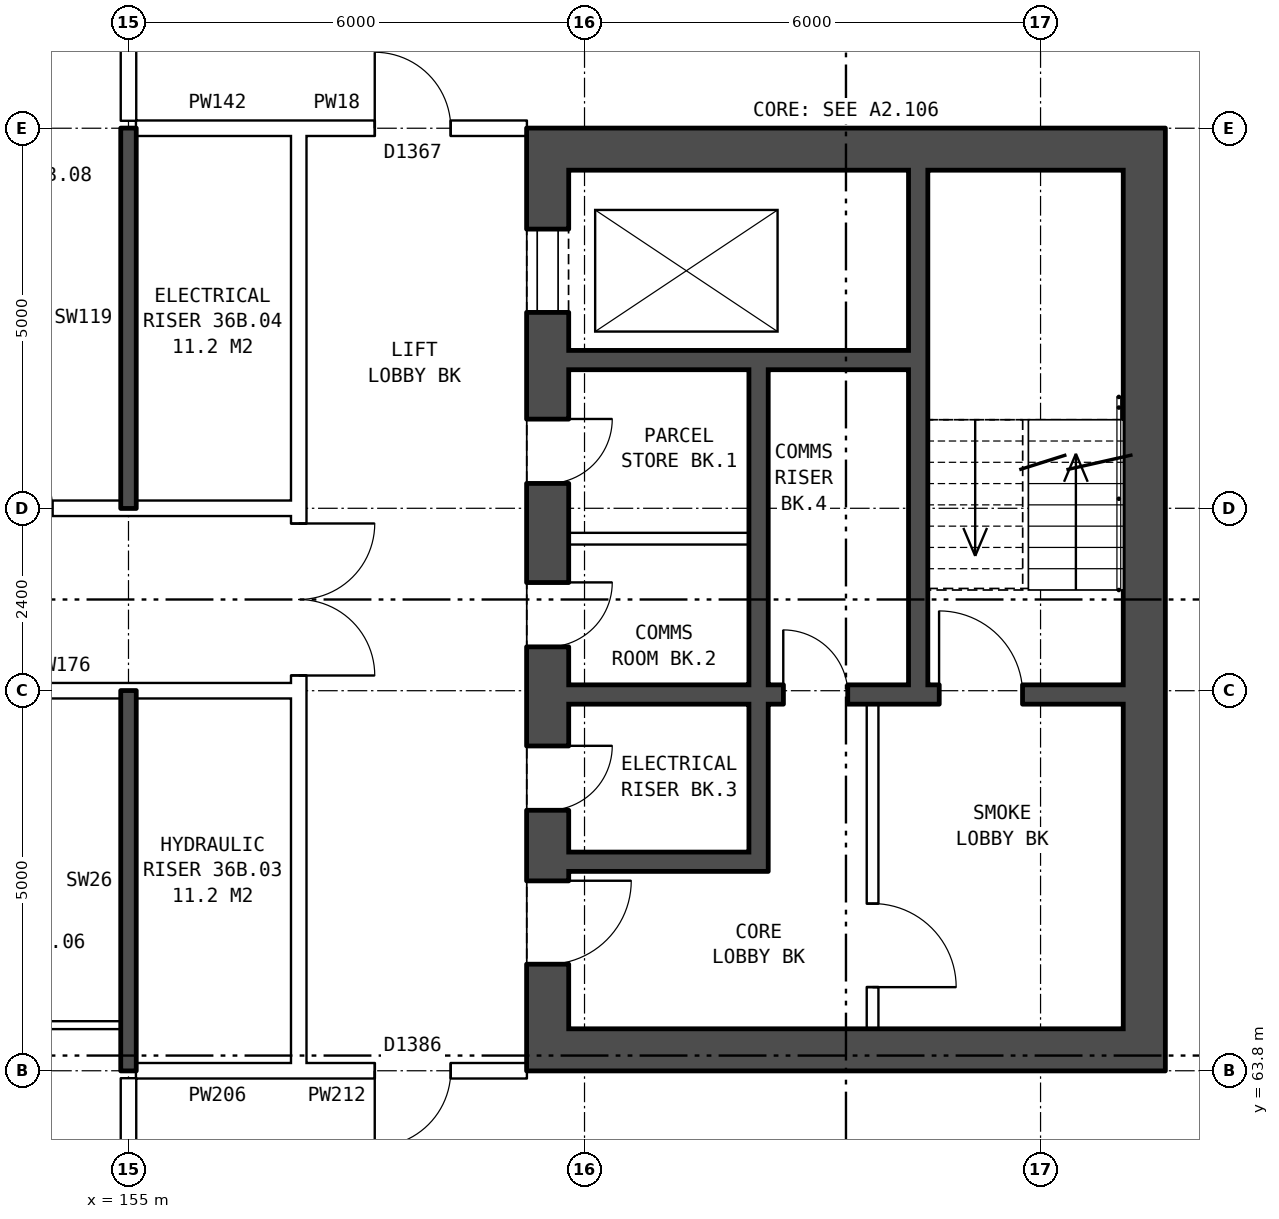
"""IFC4 building model, lengths in metres.
Left out: names, types, materials, properties, quantities, classifications, styles, units other than length and angle.
Written with IfcOpenShell. Run it as: python <this file> out.ifc"""

import sys

from ifc_helpers import new_model, si_unit, direction, frame, frame_2d, origin, place, context, subcontext, project, spatial, rectangle, extrude, element, fill, save


model = new_model("IFC4")
c1 = context("Model", 3, precision=1e-05, world=origin(), true_north=direction((0.0, 1.0)))
c2 = subcontext(c1, "Body", "Model", "MODEL_VIEW")
j1 = project(units=[si_unit("LENGTHUNIT", "METRE"), si_unit("PLANEANGLEUNIT", "RADIAN")], contexts=[c1])
p1 = place(None, origin())
s1 = spatial("IfcSite", under=j1, at=p1, CompositionType="ELEMENT")
p2 = place(p1, origin())
s2 = spatial("IfcBuilding", under=s1, at=p2, CompositionType="ELEMENT")
p3 = place(p2, frame((0.0, 0.0, 129.9)))
s3 = spatial("IfcBuildingStorey", under=s2, at=p3, CompositionType="ELEMENT", Elevation=129.9)
p4 = place(p3, frame((160.515, 76.2, 0.0), z_axis=(0.0, 0.0, 1.0), x_axis=(0.0, -1.0, 0.0)))
e1 = element("IfcWall", 1, at=p4, inside=s3, PredefinedType="SHEAR", context=c2, shape_type="SweptSolid", body=[
    extrude(rectangle(XDim=12.4, YDim=0.55, at=frame_2d((6.2, 0.0))), origin(), (0.0, 0.0, 1.0), 2.85),
])
p5 = place(p4, frame((1.325, 0.0, 0.0)))
e2 = element("IfcOpeningElement", 2, at=p5, cuts=e1, PredefinedType="OPENING", context=c2, shape_type="SweptSolid", body=[
    extrude(rectangle(XDim=1.1, YDim=2.1, at=frame_2d((0.55, 1.05))), frame((0.0, 0.285, 0.0), z_axis=(0.0, -1.0, 0.0), x_axis=(1.0, 0.0, 0.0)), (0.0, 0.0, 1.0), 0.57),
])
p6 = place(p4, frame((3.825, 0.0, 0.0)))
e3 = element("IfcOpeningElement", 3, at=p6, cuts=e1, PredefinedType="OPENING", context=c2, shape_type="SweptSolid", body=[
    extrude(rectangle(XDim=0.85, YDim=2.1, at=frame_2d((0.425, 1.05))), frame((0.0, 0.285, 0.0), z_axis=(0.0, -1.0, 0.0), x_axis=(1.0, 0.0, 0.0)), (0.0, 0.0, 1.0), 0.57),
])
p7 = place(p4, frame((5.975, 0.0, 0.0)))
e4 = element("IfcOpeningElement", 4, at=p7, cuts=e1, PredefinedType="OPENING", context=c2, shape_type="SweptSolid", body=[
    extrude(rectangle(XDim=0.85, YDim=2.1, at=frame_2d((0.425, 1.05))), frame((0.0, 0.285, 0.0), z_axis=(0.0, -1.0, 0.0), x_axis=(1.0, 0.0, 0.0)), (0.0, 0.0, 1.0), 0.57),
])
p8 = place(p4, frame((9.9, 0.0, 0.0)))
e5 = element("IfcOpeningElement", 5, at=p8, cuts=e1, PredefinedType="OPENING", context=c2, shape_type="SweptSolid", body=[
    extrude(rectangle(XDim=1.1, YDim=2.1, at=frame_2d((0.55, 1.05))), frame((0.0, 0.285, 0.0), z_axis=(0.0, -1.0, 0.0), x_axis=(1.0, 0.0, 0.0)), (0.0, 0.0, 1.0), 0.57),
])
p9 = place(p4, frame((8.125, 0.0, 0.0)))
e6 = element("IfcOpeningElement", 6, at=p9, cuts=e1, PredefinedType="OPENING", context=c2, shape_type="SweptSolid", body=[
    extrude(rectangle(XDim=0.85, YDim=2.1, at=frame_2d((0.425, 1.05))), frame((0.0, 0.285, 0.0), z_axis=(0.0, -1.0, 0.0), x_axis=(1.0, 0.0, 0.0)), (0.0, 0.0, 1.0), 0.57),
])
p10 = place(p3, frame((168.365, 76.2, 0.0), z_axis=(0.0, 0.0, 1.0), x_axis=(0.0, -1.0, 0.0)))
e7 = element("IfcWall", 7, at=p10, inside=s3, PredefinedType="SHEAR", context=c2, shape_type="SweptSolid", body=[
    extrude(rectangle(XDim=12.4, YDim=0.55, at=frame_2d((6.2, 0.0))), origin(), (0.0, 0.0, 1.0), 2.85),
])
for number, where, z_axis, x_axis in (
    (8, (160.79, 75.925, 0.0), (0.0, 0.0, 1.0), (1.0, 0.0, 0.0)),
    (9, (160.79, 64.075, 0.0), (0.0, 0.0, 1.0), (1.0, 0.0, 0.0)),
):
    element("IfcWall", number, at=place(p3, frame(where, z_axis=z_axis, x_axis=x_axis)), inside=s3, PredefinedType="SHEAR", context=c2, shape_type="SweptSolid", body=[
        extrude(rectangle(XDim=7.3, YDim=0.55, at=frame_2d((3.65, 0.0))), origin(), (0.0, 0.0, 1.0), 2.85),
    ])
p11 = place(p3, frame((160.79, 73.15, 0.0), z_axis=(0.0, 0.0, 1.0), x_axis=(1.0, 0.0, 0.0)))
e10 = element("IfcWall", 10, at=p11, inside=s3, PredefinedType="SHEAR", context=c2, shape_type="SweptSolid", body=[
    extrude(rectangle(XDim=4.475, YDim=0.25, at=frame_2d((2.237, 0.0))), origin(), (0.0, 0.0, 1.0), 2.85),
])
p12 = place(p3, frame((160.79, 70.8, 0.0), z_axis=(0.0, 0.0, 1.0), x_axis=(1.0, 0.0, 0.0)))
e11 = element("IfcWall", 11, at=p12, inside=s3, PredefinedType="PARTITIONING", context=c2, shape_type="SweptSolid", body=[
    extrude(rectangle(XDim=2.375, YDim=0.15, at=frame_2d((1.188, 0.0))), origin(), (0.0, 0.0, 1.0), 2.85),
])
p13 = place(p3, frame((160.79, 68.75, 0.0), z_axis=(0.0, 0.0, 1.0), x_axis=(1.0, 0.0, 0.0)))
e12 = element("IfcWall", 12, at=p13, inside=s3, PredefinedType="SHEAR", context=c2, shape_type="SweptSolid", body=[
    extrude(rectangle(XDim=7.3, YDim=0.25, at=frame_2d((3.65, 0.0))), origin(), (0.0, 0.0, 1.0), 2.85),
])
p14 = place(p13, frame((4.875, 0.0, 0.0)))
e13 = element("IfcOpeningElement", 13, at=p14, cuts=e12, PredefinedType="OPENING", context=c2, shape_type="SweptSolid", body=[
    extrude(rectangle(XDim=1.1, YDim=2.1, at=frame_2d((0.55, 1.05))), frame((0.0, 0.135, 0.0), z_axis=(0.0, -1.0, 0.0), x_axis=(1.0, 0.0, 0.0)), (0.0, 0.0, 1.0), 0.27),
])
p15 = place(p13, frame((2.825, 0.0, 0.0)))
e14 = element("IfcOpeningElement", 14, at=p15, cuts=e12, PredefinedType="OPENING", context=c2, shape_type="SweptSolid", body=[
    extrude(rectangle(XDim=0.85, YDim=2.1, at=frame_2d((0.425, 1.05))), frame((0.0, 0.135, 0.0), z_axis=(0.0, -1.0, 0.0), x_axis=(1.0, 0.0, 0.0)), (0.0, 0.0, 1.0), 0.27),
])
p16 = place(p3, frame((160.79, 66.55, 0.0), z_axis=(0.0, 0.0, 1.0), x_axis=(1.0, 0.0, 0.0)))
e15 = element("IfcWall", 15, at=p16, inside=s3, PredefinedType="SHEAR", context=c2, shape_type="SweptSolid", body=[
    extrude(rectangle(XDim=2.375, YDim=0.25, at=frame_2d((1.188, 0.0))), origin(), (0.0, 0.0, 1.0), 2.85),
])
p17 = place(p3, frame((163.29, 73.025, 0.0), z_axis=(0.0, 0.0, 1.0), x_axis=(0.0, -1.0, 0.0)))
e16 = element("IfcWall", 16, at=p17, inside=s3, PredefinedType="SHEAR", context=c2, shape_type="SweptSolid", body=[
    extrude(rectangle(XDim=4.15, YDim=0.25, at=frame_2d((2.075, 0.0))), origin(), (0.0, 0.0, 1.0), 2.85),
])
p18 = place(p3, frame((163.29, 68.625, 0.0), z_axis=(0.0, 0.0, 1.0), x_axis=(0.0, -1.0, 0.0)))
e17 = element("IfcWall", 17, at=p18, inside=s3, PredefinedType="SHEAR", context=c2, shape_type="SweptSolid", body=[
    extrude(rectangle(XDim=2.2, YDim=0.25, at=frame_2d((1.1, 0.0))), origin(), (0.0, 0.0, 1.0), 2.85),
])
p19 = place(p3, frame((164.79, 68.625, 0.0), z_axis=(0.0, 0.0, 1.0), x_axis=(0.0, -1.0, 0.0)))
e18 = element("IfcWall", 18, at=p19, inside=s3, PredefinedType="PARTITIONING", context=c2, shape_type="SweptSolid", body=[
    extrude(rectangle(XDim=4.275, YDim=0.15, at=frame_2d((2.137, 0.0))), origin(), (0.0, 0.0, 1.0), 2.85),
])
p20 = place(p19, frame((2.625, 0.0, 0.0)))
e19 = element("IfcOpeningElement", 19, at=p20, cuts=e18, PredefinedType="OPENING", context=c2, shape_type="SweptSolid", body=[
    extrude(rectangle(XDim=1.1, YDim=2.1, at=frame_2d((0.55, 1.05))), frame((0.0, 0.085, 0.0), z_axis=(0.0, -1.0, 0.0), x_axis=(1.0, 0.0, 0.0)), (0.0, 0.0, 1.0), 0.17),
])
p21 = place(p3, frame((165.39, 75.65, 0.0), z_axis=(0.0, 0.0, 1.0), x_axis=(0.0, -1.0, 0.0)))
e20 = element("IfcWall", 20, at=p21, inside=s3, PredefinedType="SHEAR", context=c2, shape_type="SweptSolid", body=[
    extrude(rectangle(XDim=6.775, YDim=0.25, at=frame_2d((3.387, 0.0))), origin(), (0.0, 0.0, 1.0), 2.85),
])
p22 = place(p3, frame((157.24, 63.9, 0.0), z_axis=(0.0, 0.0, 1.0), x_axis=(0.0, 1.0, 0.0)))
e21 = element("IfcWall", 21, at=p22, inside=s3, PredefinedType="PARTITIONING", context=c2, shape_type="SweptSolid", body=[
    extrude(rectangle(XDim=12.2, YDim=0.2, at=frame_2d((6.1, 0.0))), origin(), (0.0, 0.0, 1.0), 2.85),
])
p23 = place(p22, frame((5.1, 0.0, 0.0)))
e22 = element("IfcOpeningElement", 22, at=p23, cuts=e21, PredefinedType="OPENING", context=c2, shape_type="SweptSolid", body=[
    extrude(rectangle(XDim=2.0, YDim=2.1, at=frame_2d((1.0, 1.05))), frame((0.0, 0.11, 0.0), z_axis=(0.0, -1.0, 0.0), x_axis=(1.0, 0.0, 0.0)), (0.0, 0.0, 1.0), 0.22),
])
p24 = place(p3, frame((155.1, 63.8, 0.0), z_axis=(0.0, 0.0, 1.0), x_axis=(1.0, 0.0, 0.0)))
e23 = element("IfcWall", 23, at=p24, inside=s3, PredefinedType="PARTITIONING", context=c2, shape_type="SweptSolid", body=[
    extrude(rectangle(XDim=2.14, YDim=0.2, at=frame_2d((1.07, 0.0))), origin(), (0.0, 0.0, 1.0), 2.85),
])
p25 = place(p3, frame((157.24, 63.8, 0.0), z_axis=(0.0, 0.0, 1.0), x_axis=(1.0, 0.0, 0.0)))
e24 = element("IfcWall", 24, at=p25, inside=s3, PredefinedType="PARTITIONING", context=c2, shape_type="SweptSolid", body=[
    extrude(rectangle(XDim=3.0, YDim=0.2, at=frame_2d((1.5, 0.0))), origin(), (0.0, 0.0, 1.0), 2.85),
])
p26 = place(p25, frame((1.0, 0.0, 0.0)))
e25 = element("IfcOpeningElement", 25, at=p26, cuts=e24, PredefinedType="OPENING", context=c2, shape_type="SweptSolid", body=[
    extrude(rectangle(XDim=1.0, YDim=2.1, at=frame_2d((0.5, 1.05))), frame((0.0, 0.11, 0.0), z_axis=(0.0, -1.0, 0.0), x_axis=(1.0, 0.0, 0.0)), (0.0, 0.0, 1.0), 0.22),
])
p27 = place(p3, frame((152.0, 64.4, 0.0), z_axis=(0.0, 0.0, 1.0), x_axis=(1.0, 0.0, 0.0)))
e26 = element("IfcWall", 26, at=p27, inside=s3, PredefinedType="PARTITIONING", context=c2, shape_type="SweptSolid", body=[
    extrude(rectangle(XDim=2.9, YDim=0.1, at=frame_2d((1.45, 0.0))), origin(), (0.0, 0.0, 1.0), 2.85),
])
p28 = place(p3, frame((142.76, 68.8, 0.0), z_axis=(0.0, 0.0, 1.0), x_axis=(1.0, 0.0, 0.0)))
e27 = element("IfcWall", 27, at=p28, inside=s3, PredefinedType="PARTITIONING", context=c2, shape_type="SweptSolid", body=[
    extrude(rectangle(XDim=14.48, YDim=0.2, at=frame_2d((7.24, 0.0))), origin(), (0.0, 0.0, 1.0), 2.85),
])
p29 = place(p28, frame((1.12, 0.0, 0.0)))
e28 = element("IfcOpeningElement", 28, at=p29, cuts=e27, PredefinedType="OPENING", context=c2, shape_type="SweptSolid", body=[
    extrude(rectangle(XDim=1.0, YDim=2.1, at=frame_2d((0.5, 1.05))), frame((0.0, 0.11, 0.0), z_axis=(0.0, -1.0, 0.0), x_axis=(1.0, 0.0, 0.0)), (0.0, 0.0, 1.0), 0.22),
])
p30 = place(p28, frame((7.24, 0.0, 0.0)))
e29 = element("IfcOpeningElement", 29, at=p30, cuts=e27, PredefinedType="OPENING", context=c2, shape_type="SweptSolid", body=[
    extrude(rectangle(XDim=1.0, YDim=2.1, at=frame_2d((0.5, 1.05))), frame((0.0, 0.11, 0.0), z_axis=(0.0, -1.0, 0.0), x_axis=(1.0, 0.0, 0.0)), (0.0, 0.0, 1.0), 0.22),
])
p31 = place(p3, frame((142.76, 71.2, 0.0), z_axis=(0.0, 0.0, 1.0), x_axis=(1.0, 0.0, 0.0)))
e30 = element("IfcWall", 30, at=p31, inside=s3, PredefinedType="PARTITIONING", context=c2, shape_type="SweptSolid", body=[
    extrude(rectangle(XDim=14.48, YDim=0.2, at=frame_2d((7.24, 0.0))), origin(), (0.0, 0.0, 1.0), 2.85),
])
p32 = place(p31, frame((1.12, 0.0, 0.0)))
e31 = element("IfcOpeningElement", 31, at=p32, cuts=e30, PredefinedType="OPENING", context=c2, shape_type="SweptSolid", body=[
    extrude(rectangle(XDim=1.0, YDim=2.1, at=frame_2d((0.5, 1.05))), frame((0.0, 0.11, 0.0), z_axis=(0.0, -1.0, 0.0), x_axis=(1.0, 0.0, 0.0)), (0.0, 0.0, 1.0), 0.22),
])
p33 = place(p31, frame((10.24, 0.0, 0.0)))
e32 = element("IfcOpeningElement", 32, at=p33, cuts=e30, PredefinedType="OPENING", context=c2, shape_type="SweptSolid", body=[
    extrude(rectangle(XDim=1.0, YDim=2.1, at=frame_2d((0.5, 1.05))), frame((0.0, 0.11, 0.0), z_axis=(0.0, -1.0, 0.0), x_axis=(1.0, 0.0, 0.0)), (0.0, 0.0, 1.0), 0.22),
])
p34 = place(p3, frame((155.1, 76.2, 0.0), z_axis=(0.0, 0.0, 1.0), x_axis=(1.0, 0.0, 0.0)))
e33 = element("IfcWall", 33, at=p34, inside=s3, PredefinedType="PARTITIONING", context=c2, shape_type="SweptSolid", body=[
    extrude(rectangle(XDim=2.14, YDim=0.2, at=frame_2d((1.07, 0.0))), origin(), (0.0, 0.0, 1.0), 2.85),
])
p35 = place(p3, frame((157.24, 76.2, 0.0), z_axis=(0.0, 0.0, 1.0), x_axis=(1.0, 0.0, 0.0)))
e34 = element("IfcWall", 34, at=p35, inside=s3, PredefinedType="PARTITIONING", context=c2, shape_type="SweptSolid", body=[
    extrude(rectangle(XDim=3.0, YDim=0.2, at=frame_2d((1.5, 0.0))), origin(), (0.0, 0.0, 1.0), 2.85),
])
p36 = place(p35, frame((1.0, 0.0, 0.0)))
e35 = element("IfcOpeningElement", 35, at=p36, cuts=e34, PredefinedType="OPENING", context=c2, shape_type="SweptSolid", body=[
    extrude(rectangle(XDim=1.0, YDim=2.1, at=frame_2d((0.5, 1.05))), frame((0.0, 0.11, 0.0), z_axis=(0.0, -1.0, 0.0), x_axis=(1.0, 0.0, 0.0)), (0.0, 0.0, 1.0), 0.22),
])
p37 = place(p3, frame((155.0, 61.5, 0.0), z_axis=(0.0, 0.0, 1.0), x_axis=(0.0, 1.0, 0.0)))
e36 = element("IfcWall", 36, at=p37, inside=s3, PredefinedType="PARTITIONING", context=c2, shape_type="SweptSolid", body=[
    extrude(rectangle(XDim=2.2, YDim=0.2, at=frame_2d((1.1, 0.0))), origin(), (0.0, 0.0, 1.0), 2.85),
])
for number, where, z_axis, x_axis in (
    (37, (155.0, 63.8, 0.0), (0.0, 0.0, 1.0), (0.0, 1.0, 0.0)),
    (38, (155.0, 71.2, 0.0), (0.0, 0.0, 1.0), (0.0, 1.0, 0.0)),
):
    element("IfcWall", number, at=place(p3, frame(where, z_axis=z_axis, x_axis=x_axis)), inside=s3, PredefinedType="SOLIDWALL", context=c2, shape_type="SweptSolid", body=[
        extrude(rectangle(XDim=5.0, YDim=0.2, at=frame_2d((2.5, 0.0))), origin(), (0.0, 0.0, 1.0), 2.85),
    ])
p38 = place(p3, frame((155.0, 76.3, 0.0), z_axis=(0.0, 0.0, 1.0), x_axis=(0.0, 1.0, 0.0)))
e39 = element("IfcWall", 39, at=p38, inside=s3, PredefinedType="PARTITIONING", context=c2, shape_type="SweptSolid", body=[
    extrude(rectangle(XDim=2.2, YDim=0.2, at=frame_2d((1.1, 0.0))), origin(), (0.0, 0.0, 1.0), 2.85),
])
p39 = place(p5, origin())
e40 = element("IfcDoor", 40, at=p39, inside=s3, OperationType="DOUBLE_DOOR_SLIDING", PredefinedType="DOOR", context=c2, shape_type="SweptSolid", body=[
    extrude(rectangle(XDim=1.1, YDim=2.1, at=frame_2d((0.55, 1.05))), frame((0.0, 0.26, 0.0), z_axis=(0.0, -1.0, 0.0), x_axis=(1.0, 0.0, 0.0)), (0.0, 0.0, 1.0), 0.05),
])
fill(e2, e40)
p40 = place(p6, origin())
e41 = element("IfcDoor", 41, at=p40, inside=s3, OperationType="SINGLE_SWING_LEFT", PredefinedType="DOOR", context=c2, shape_type="SweptSolid", body=[
    extrude(rectangle(XDim=0.85, YDim=2.1, at=frame_2d((0.425, 1.05))), frame((0.0, 0.26, 0.0), z_axis=(0.0, -1.0, 0.0), x_axis=(1.0, 0.0, 0.0)), (0.0, 0.0, 1.0), 0.05),
])
fill(e3, e41)
p41 = place(p7, origin())
e42 = element("IfcDoor", 42, at=p41, inside=s3, OperationType="SINGLE_SWING_LEFT", PredefinedType="DOOR", context=c2, shape_type="SweptSolid", body=[
    extrude(rectangle(XDim=0.85, YDim=2.1, at=frame_2d((0.425, 1.05))), frame((0.0, 0.26, 0.0), z_axis=(0.0, -1.0, 0.0), x_axis=(1.0, 0.0, 0.0)), (0.0, 0.0, 1.0), 0.05),
])
fill(e4, e42)
p42 = place(p8, origin())
e43 = element("IfcDoor", 43, at=p42, inside=s3, OperationType="SINGLE_SWING_LEFT", PredefinedType="DOOR", context=c2, shape_type="SweptSolid", body=[
    extrude(rectangle(XDim=1.1, YDim=2.1, at=frame_2d((0.55, 1.05))), frame((0.0, 0.26, 0.0), z_axis=(0.0, -1.0, 0.0), x_axis=(1.0, 0.0, 0.0)), (0.0, 0.0, 1.0), 0.05),
])
fill(e5, e43)
p43 = place(p20, origin())
e44 = element("IfcDoor", 44, at=p43, inside=s3, OperationType="SINGLE_SWING_RIGHT", PredefinedType="DOOR", context=c2, shape_type="SweptSolid", body=[
    extrude(rectangle(XDim=1.1, YDim=2.1, at=frame_2d((0.55, 1.05))), frame((0.0, 0.025, 0.0), z_axis=(0.0, -1.0, 0.0), x_axis=(1.0, 0.0, 0.0)), (0.0, 0.0, 1.0), 0.05),
])
fill(e19, e44)
p44 = place(p14, origin())
e45 = element("IfcDoor", 45, at=p44, inside=s3, OperationType="SINGLE_SWING_LEFT", PredefinedType="DOOR", context=c2, shape_type="SweptSolid", body=[
    extrude(rectangle(XDim=1.1, YDim=2.1, at=frame_2d((0.55, 1.05))), frame((0.0, 0.025, 0.0), z_axis=(0.0, -1.0, 0.0), x_axis=(1.0, 0.0, 0.0)), (0.0, 0.0, 1.0), 0.05),
])
fill(e13, e45)
p45 = place(p9, origin())
e46 = element("IfcDoor", 46, at=p45, inside=s3, OperationType="SINGLE_SWING_LEFT", PredefinedType="DOOR", context=c2, shape_type="SweptSolid", body=[
    extrude(rectangle(XDim=0.85, YDim=2.1, at=frame_2d((0.425, 1.05))), frame((0.0, 0.26, 0.0), z_axis=(0.0, -1.0, 0.0), x_axis=(1.0, 0.0, 0.0)), (0.0, 0.0, 1.0), 0.05),
])
fill(e6, e46)
p46 = place(p15, origin())
e47 = element("IfcDoor", 47, at=p46, inside=s3, OperationType="SINGLE_SWING_LEFT", PredefinedType="DOOR", context=c2, shape_type="SweptSolid", body=[
    extrude(rectangle(XDim=0.85, YDim=2.1, at=frame_2d((0.425, 1.05))), frame((0.0, 0.025, 0.0), z_axis=(0.0, -1.0, 0.0), x_axis=(1.0, 0.0, 0.0)), (0.0, 0.0, 1.0), 0.05),
])
fill(e14, e47)
p47 = place(p23, frame((2.0, 0.0, 0.0), z_axis=(0.0, 0.0, 1.0), x_axis=(-1.0, 0.0, 0.0)))
e48 = element("IfcDoor", 48, at=p47, inside=s3, OperationType="DOUBLE_DOOR_SINGLE_SWING", PredefinedType="DOOR", context=c2, shape_type="SweptSolid", body=[
    extrude(rectangle(XDim=2.0, YDim=2.1, at=frame_2d((1.0, 1.05))), frame((0.0, 0.025, 0.0), z_axis=(0.0, -1.0, 0.0), x_axis=(1.0, 0.0, 0.0)), (0.0, 0.0, 1.0), 0.05),
])
fill(e22, e48)
p48 = place(p26, frame((1.0, 0.0, 0.0), z_axis=(0.0, 0.0, 1.0), x_axis=(-1.0, 0.0, 0.0)))
e49 = element("IfcDoor", 49, at=p48, inside=s3, OperationType="SINGLE_SWING_RIGHT", PredefinedType="DOOR", context=c2, shape_type="SweptSolid", body=[
    extrude(rectangle(XDim=1.0, YDim=2.1, at=frame_2d((0.5, 1.05))), frame((0.0, 0.025, 0.0), z_axis=(0.0, -1.0, 0.0), x_axis=(1.0, 0.0, 0.0)), (0.0, 0.0, 1.0), 0.05),
])
fill(e25, e49)
p49 = place(p36, origin())
e50 = element("IfcDoor", 50, at=p49, inside=s3, OperationType="SINGLE_SWING_LEFT", PredefinedType="DOOR", context=c2, shape_type="SweptSolid", body=[
    extrude(rectangle(XDim=1.0, YDim=2.1, at=frame_2d((0.5, 1.05))), frame((0.0, 0.025, 0.0), z_axis=(0.0, -1.0, 0.0), x_axis=(1.0, 0.0, 0.0)), (0.0, 0.0, 1.0), 0.05),
])
fill(e35, e50)
save(model, sys.argv[1])
